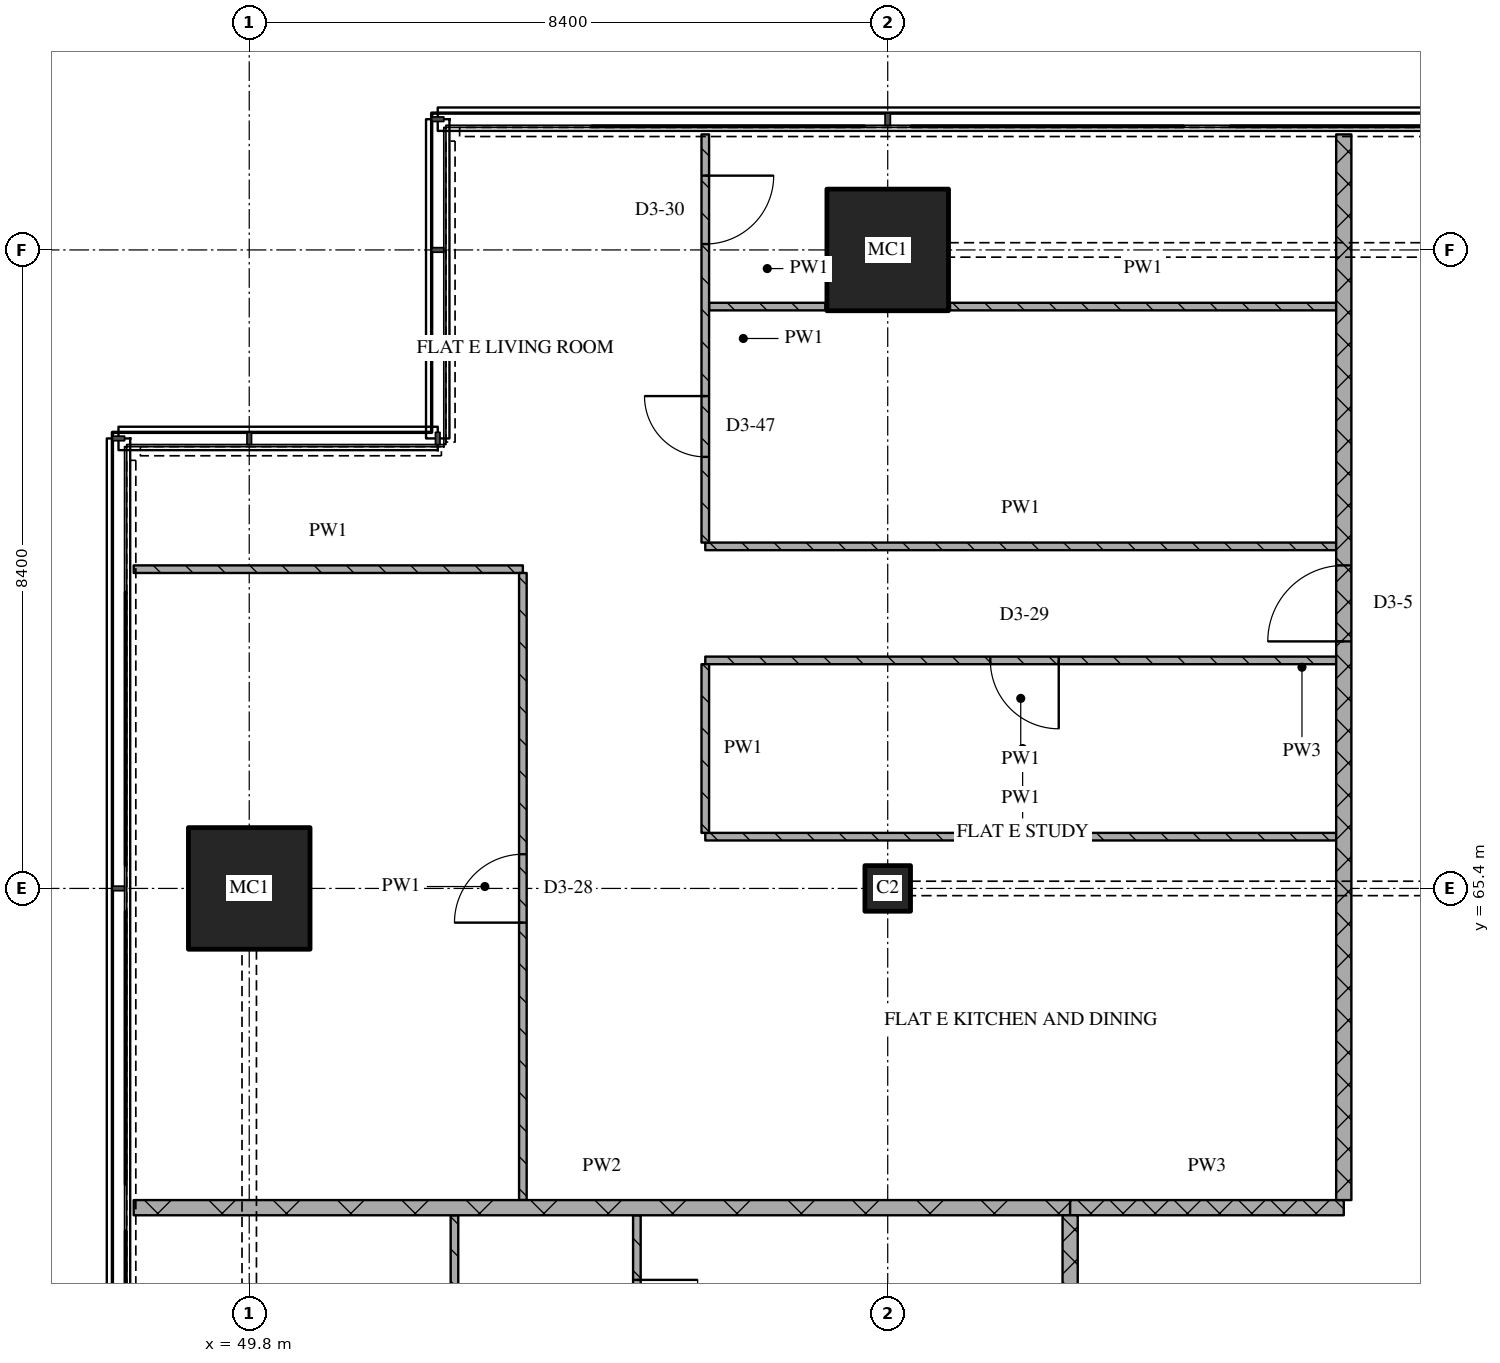
"""IFC4 building model, lengths in metres.
Left out: names, types, materials, properties, quantities, classifications, styles, units other than length and angle.
Written with IfcOpenShell. Run it as: python <this file> out.ifc"""

import sys

from ifc_helpers import new_model, si_unit, direction, frame, frame_2d, origin, origin_2d, place, context, subcontext, project, spatial, rectangle, extrude, element, fill, save


model = new_model("IFC4")
c1 = context("Model", 3, precision=1e-05, world=origin(), true_north=direction((0.0, 1.0)))
c2 = subcontext(c1, "Body", "Model", "MODEL_VIEW")
j1 = project(units=[si_unit("LENGTHUNIT", "METRE"), si_unit("PLANEANGLEUNIT", "RADIAN")], contexts=[c1])
p1 = place(None, origin())
s1 = spatial("IfcSite", under=j1, at=p1, CompositionType="ELEMENT")
p2 = place(p1, origin())
s2 = spatial("IfcBuilding", under=s1, at=p2, CompositionType="ELEMENT")
p3 = place(p2, frame((0.0, 0.0, 234.3)))
s3 = spatial("IfcBuildingStorey", under=s2, at=p3, CompositionType="ELEMENT", Elevation=234.3)
p4 = place(p3, frame((49.8, 65.4, 0.0), z_axis=(0.0, 0.0, 1.0), x_axis=(1.0, 0.0, 0.0)))
e1 = element("IfcColumn", 1, at=p4, inside=s3, PredefinedType="COLUMN", context=c2, shape_type="SweptSolid", body=[
    extrude(rectangle(XDim=1.6, YDim=1.6, at=origin_2d()), origin(), (0.0, 0.0, 1.0), 3.6),
])
p5 = place(p3, frame((58.2, 65.4, 0.0), z_axis=(0.0, 0.0, 1.0), x_axis=(1.0, 0.0, 0.0)))
e2 = element("IfcColumn", 2, at=p5, inside=s3, PredefinedType="COLUMN", context=c2, shape_type="SweptSolid", body=[
    extrude(rectangle(XDim=0.6, YDim=0.6, at=origin_2d()), origin(), (0.0, 0.0, 1.0), 3.6),
])
p6 = place(p3, frame((58.2, 73.8, 0.0), z_axis=(0.0, 0.0, 1.0), x_axis=(1.0, 0.0, 0.0)))
e3 = element("IfcColumn", 3, at=p6, inside=s3, PredefinedType="COLUMN", context=c2, shape_type="SweptSolid", body=[
    extrude(rectangle(XDim=1.6, YDim=1.6, at=origin_2d()), origin(), (0.0, 0.0, 1.0), 3.6),
])
p7 = place(p3, frame((60.6, 61.2, 0.0), z_axis=(0.0, 0.0, 1.0), x_axis=(1.0, 0.0, 0.0)))
e4 = element("IfcWall", 4, at=p7, inside=s3, PredefinedType="PARTITIONING", context=c2, shape_type="SweptSolid", body=[
    extrude(rectangle(XDim=3.6, YDim=0.2, at=frame_2d((1.8, 0.0))), origin(), (0.0, 0.0, 1.0), 3.32),
])
p8 = place(p3, frame((48.28, 61.2, 0.0), z_axis=(0.0, 0.0, 1.0), x_axis=(1.0, 0.0, 0.0)))
e5 = element("IfcWall", 5, at=p8, inside=s3, PredefinedType="PARTITIONING", context=c2, shape_type="SweptSolid", body=[
    extrude(rectangle(XDim=12.32, YDim=0.2, at=frame_2d((6.16, 0.0))), origin(), (0.0, 0.0, 1.0), 3.32),
])
p9 = place(p3, frame((55.8, 66.081, 0.0), z_axis=(0.0, 0.0, 1.0), x_axis=(1.0, 0.0, 0.0)))
e6 = element("IfcWall", 6, at=p9, inside=s3, PredefinedType="PARTITIONING", context=c2, shape_type="SweptSolid", body=[
    extrude(rectangle(XDim=8.3, YDim=0.1, at=frame_2d((4.15, 0.0))), origin(), (0.0, 0.0, 1.0), 3.32),
])
p10 = place(p3, frame((64.1, 68.4, 0.0), z_axis=(0.0, 0.0, 1.0), x_axis=(-1.0, 0.0, 0.0)))
e7 = element("IfcWall", 7, at=p10, inside=s3, PredefinedType="PARTITIONING", context=c2, shape_type="SweptSolid", body=[
    extrude(rectangle(XDim=8.3, YDim=0.1, at=frame_2d((4.15, 0.0))), origin(), (0.0, 0.0, 1.0), 3.32),
])
p11 = place(p10, frame((3.65, 0.0, 0.0)))
e8 = element("IfcOpeningElement", 8, at=p11, cuts=e7, PredefinedType="OPENING", context=c2, shape_type="SweptSolid", body=[
    extrude(rectangle(XDim=0.9, YDim=2.1, at=frame_2d((0.45, 1.05))), frame((0.0, 0.06, 0.0), z_axis=(0.0, -1.0, 0.0), x_axis=(1.0, 0.0, 0.0)), (0.0, 0.0, 1.0), 0.12),
])
p12 = place(p3, frame((48.28, 69.6, 0.0), z_axis=(0.0, 0.0, 1.0), x_axis=(1.0, 0.0, 0.0)))
e9 = element("IfcWall", 9, at=p12, inside=s3, PredefinedType="PARTITIONING", context=c2, shape_type="SweptSolid", body=[
    extrude(rectangle(XDim=5.12, YDim=0.1, at=frame_2d((2.56, 0.0))), origin(), (0.0, 0.0, 1.0), 3.32),
])
p13 = place(p3, frame((55.8, 69.9, 0.0), z_axis=(0.0, 0.0, 1.0), x_axis=(1.0, 0.0, 0.0)))
e10 = element("IfcWall", 10, at=p13, inside=s3, PredefinedType="PARTITIONING", context=c2, shape_type="SweptSolid", body=[
    extrude(rectangle(XDim=8.3, YDim=0.1, at=frame_2d((4.15, 0.0))), origin(), (0.0, 0.0, 1.0), 3.32),
])
p14 = place(p3, frame((55.85, 73.055, 0.0), z_axis=(0.0, 0.0, 1.0), x_axis=(1.0, 0.0, 0.0)))
e11 = element("IfcWall", 11, at=p14, inside=s3, PredefinedType="PARTITIONING", context=c2, shape_type="SweptSolid", body=[
    extrude(rectangle(XDim=1.53, YDim=0.1, at=frame_2d((0.765, 0.0))), origin(), (0.0, 0.0, 1.0), 3.32),
])
p15 = place(p3, frame((59.02, 73.055, 0.0), z_axis=(0.0, 0.0, 1.0), x_axis=(1.0, 0.0, 0.0)))
e12 = element("IfcWall", 12, at=p15, inside=s3, PredefinedType="PARTITIONING", context=c2, shape_type="SweptSolid", body=[
    extrude(rectangle(XDim=5.08, YDim=0.1, at=frame_2d((2.54, 0.0))), origin(), (0.0, 0.0, 1.0), 3.32),
])
p16 = place(p3, frame((52.5, 61.1, 0.0), z_axis=(0.0, 0.0, 1.0), x_axis=(0.0, -1.0, 0.0)))
e13 = element("IfcWall", 13, at=p16, inside=s3, PredefinedType="PARTITIONING", context=c2, shape_type="SweptSolid", body=[
    extrude(rectangle(XDim=8.25, YDim=0.1, at=frame_2d((4.125, 0.0))), origin(), (0.0, 0.0, 1.0), 3.32),
])
p17 = place(p3, frame((53.4, 61.3, 0.0), z_axis=(0.0, 0.0, 1.0), x_axis=(0.0, 1.0, 0.0)))
e14 = element("IfcWall", 14, at=p17, inside=s3, PredefinedType="PARTITIONING", context=c2, shape_type="SweptSolid", body=[
    extrude(rectangle(XDim=8.25, YDim=0.1, at=frame_2d((4.125, 0.0))), origin(), (0.0, 0.0, 1.0), 3.32),
])
p18 = place(p17, frame((3.65, 0.0, 0.0)))
e15 = element("IfcOpeningElement", 15, at=p18, cuts=e14, PredefinedType="OPENING", context=c2, shape_type="SweptSolid", body=[
    extrude(rectangle(XDim=0.9, YDim=2.1, at=frame_2d((0.45, 1.05))), frame((0.0, 0.06, 0.0), z_axis=(0.0, -1.0, 0.0), x_axis=(1.0, 0.0, 0.0)), (0.0, 0.0, 1.0), 0.12),
])
p19 = place(p3, frame((54.9, 61.1, 0.0), z_axis=(0.0, 0.0, 1.0), x_axis=(0.0, -1.0, 0.0)))
e16 = element("IfcWall", 16, at=p19, inside=s3, PredefinedType="PARTITIONING", context=c2, shape_type="SweptSolid", body=[
    extrude(rectangle(XDim=7.05, YDim=0.1, at=frame_2d((3.525, 0.0))), origin(), (0.0, 0.0, 1.0), 3.32),
])
p20 = place(p19, frame((0.85, 0.0, 0.0)))
e17 = element("IfcOpeningElement", 17, at=p20, cuts=e16, PredefinedType="OPENING", context=c2, shape_type="SweptSolid", body=[
    extrude(rectangle(XDim=0.8, YDim=2.1, at=frame_2d((0.4, 1.05))), frame((0.0, 0.06, 0.0), z_axis=(0.0, -1.0, 0.0), x_axis=(1.0, 0.0, 0.0)), (0.0, 0.0, 1.0), 0.12),
])
p21 = place(p3, frame((55.8, 68.35, 0.0), z_axis=(0.0, 0.0, 1.0), x_axis=(0.0, -1.0, 0.0)))
e18 = element("IfcWall", 18, at=p21, inside=s3, PredefinedType="PARTITIONING", context=c2, shape_type="SweptSolid", body=[
    extrude(rectangle(XDim=2.219, YDim=0.1, at=frame_2d((1.109, 0.0))), origin(), (0.0, 0.0, 1.0), 3.32),
])
p22 = place(p3, frame((55.8, 75.32, 0.0), z_axis=(0.0, 0.0, 1.0), x_axis=(0.0, -1.0, 0.0)))
e19 = element("IfcWall", 19, at=p22, inside=s3, PredefinedType="PARTITIONING", context=c2, shape_type="SweptSolid", body=[
    extrude(rectangle(XDim=5.37, YDim=0.1, at=frame_2d((2.685, 0.0))), origin(), (0.0, 0.0, 1.0), 3.32),
])
p23 = place(p22, frame((0.542, 0.0, 0.0)))
e20 = element("IfcOpeningElement", 20, at=p23, cuts=e19, PredefinedType="OPENING", context=c2, shape_type="SweptSolid", body=[
    extrude(rectangle(XDim=0.9, YDim=2.1, at=frame_2d((0.45, 1.05))), frame((0.0, 0.06, 0.0), z_axis=(0.0, -1.0, 0.0), x_axis=(1.0, 0.0, 0.0)), (0.0, 0.0, 1.0), 0.12),
])
p24 = place(p22, frame((3.443, 0.0, 0.0)))
e21 = element("IfcOpeningElement", 21, at=p24, cuts=e19, PredefinedType="OPENING", context=c2, shape_type="SweptSolid", body=[
    extrude(rectangle(XDim=0.8, YDim=2.1, at=frame_2d((0.4, 1.05))), frame((0.0, 0.06, 0.0), z_axis=(0.0, -1.0, 0.0), x_axis=(1.0, 0.0, 0.0)), (0.0, 0.0, 1.0), 0.12),
])
p25 = place(p3, frame((60.6, 43.3, 0.0), z_axis=(0.0, 0.0, 1.0), x_axis=(0.0, 1.0, 0.0)))
e22 = element("IfcWall", 22, at=p25, inside=s3, PredefinedType="PARTITIONING", context=c2, shape_type="SweptSolid", body=[
    extrude(rectangle(XDim=17.8, YDim=0.2, at=frame_2d((8.9, 0.0))), origin(), (0.0, 0.0, 1.0), 3.32),
])
p26 = place(p25, frame((9.45, 0.0, 0.0)))
e23 = element("IfcOpeningElement", 23, at=p26, cuts=e22, PredefinedType="OPENING", context=c2, shape_type="SweptSolid", body=[
    extrude(rectangle(XDim=1.0, YDim=2.1, at=frame_2d((0.5, 1.05))), frame((0.0, 0.11, 0.0), z_axis=(0.0, -1.0, 0.0), x_axis=(1.0, 0.0, 0.0)), (0.0, 0.0, 1.0), 0.22),
])
p27 = place(p3, frame((64.2, 61.3, 0.0), z_axis=(0.0, 0.0, 1.0), x_axis=(0.0, 1.0, 0.0)))
e24 = element("IfcWall", 24, at=p27, inside=s3, PredefinedType="PARTITIONING", context=c2, shape_type="SweptSolid", body=[
    extrude(rectangle(XDim=14.02, YDim=0.2, at=frame_2d((7.01, 0.0))), origin(), (0.0, 0.0, 1.0), 3.32),
])
p28 = place(p27, frame((7.35, 0.0, 0.0)))
e25 = element("IfcOpeningElement", 25, at=p28, cuts=e24, PredefinedType="OPENING", context=c2, shape_type="SweptSolid", body=[
    extrude(rectangle(XDim=1.0, YDim=2.1, at=frame_2d((0.5, 1.05))), frame((0.0, 0.11, 0.0), z_axis=(0.0, -1.0, 0.0), x_axis=(1.0, 0.0, 0.0)), (0.0, 0.0, 1.0), 0.22),
])
p29 = place(p11, origin())
e26 = element("IfcDoor", 26, at=p29, inside=s3, OperationType="SINGLE_SWING_LEFT", PredefinedType="DOOR", context=c2, shape_type="SweptSolid", body=[
    extrude(rectangle(XDim=0.9, YDim=2.1, at=frame_2d((0.45, 1.05))), frame((0.0, 0.025, 0.0), z_axis=(0.0, -1.0, 0.0), x_axis=(1.0, 0.0, 0.0)), (0.0, 0.0, 1.0), 0.05),
])
fill(e8, e26)
p30 = place(p18, origin())
e27 = element("IfcDoor", 27, at=p30, inside=s3, OperationType="SINGLE_SWING_LEFT", PredefinedType="DOOR", context=c2, shape_type="SweptSolid", body=[
    extrude(rectangle(XDim=0.9, YDim=2.1, at=frame_2d((0.45, 1.05))), frame((0.0, 0.025, 0.0), z_axis=(0.0, -1.0, 0.0), x_axis=(1.0, 0.0, 0.0)), (0.0, 0.0, 1.0), 0.05),
])
fill(e15, e27)
p31 = place(p20, origin())
e28 = element("IfcDoor", 28, at=p31, inside=s3, OperationType="SINGLE_SWING_LEFT", PredefinedType="DOOR", context=c2, shape_type="SweptSolid", body=[
    extrude(rectangle(XDim=0.8, YDim=2.1, at=frame_2d((0.4, 1.05))), frame((0.0, 0.025, 0.0), z_axis=(0.0, -1.0, 0.0), x_axis=(1.0, 0.0, 0.0)), (0.0, 0.0, 1.0), 0.05),
])
fill(e17, e28)
p32 = place(p23, origin())
e29 = element("IfcDoor", 29, at=p32, inside=s3, OperationType="SINGLE_SWING_LEFT", PredefinedType="DOOR", context=c2, shape_type="SweptSolid", body=[
    extrude(rectangle(XDim=0.9, YDim=2.1, at=frame_2d((0.45, 1.05))), frame((0.0, 0.025, 0.0), z_axis=(0.0, -1.0, 0.0), x_axis=(1.0, 0.0, 0.0)), (0.0, 0.0, 1.0), 0.05),
])
fill(e20, e29)
p33 = place(p24, origin())
e30 = element("IfcDoor", 30, at=p33, inside=s3, OperationType="SINGLE_SWING_RIGHT", PredefinedType="DOOR", context=c2, shape_type="SweptSolid", body=[
    extrude(rectangle(XDim=0.8, YDim=2.1, at=frame_2d((0.4, 1.05))), frame((0.0, 0.025, 0.0), z_axis=(0.0, -1.0, 0.0), x_axis=(1.0, 0.0, 0.0)), (0.0, 0.0, 1.0), 0.05),
])
fill(e21, e30)
p34 = place(p28, origin())
e31 = element("IfcDoor", 31, at=p34, inside=s3, OperationType="SINGLE_SWING_LEFT", PredefinedType="DOOR", context=c2, shape_type="SweptSolid", body=[
    extrude(rectangle(XDim=1.0, YDim=2.1, at=frame_2d((0.5, 1.05))), frame((0.0, 0.025, 0.0), z_axis=(0.0, -1.0, 0.0), x_axis=(1.0, 0.0, 0.0)), (0.0, 0.0, 1.0), 0.05),
])
fill(e25, e31)
save(model, sys.argv[1])
